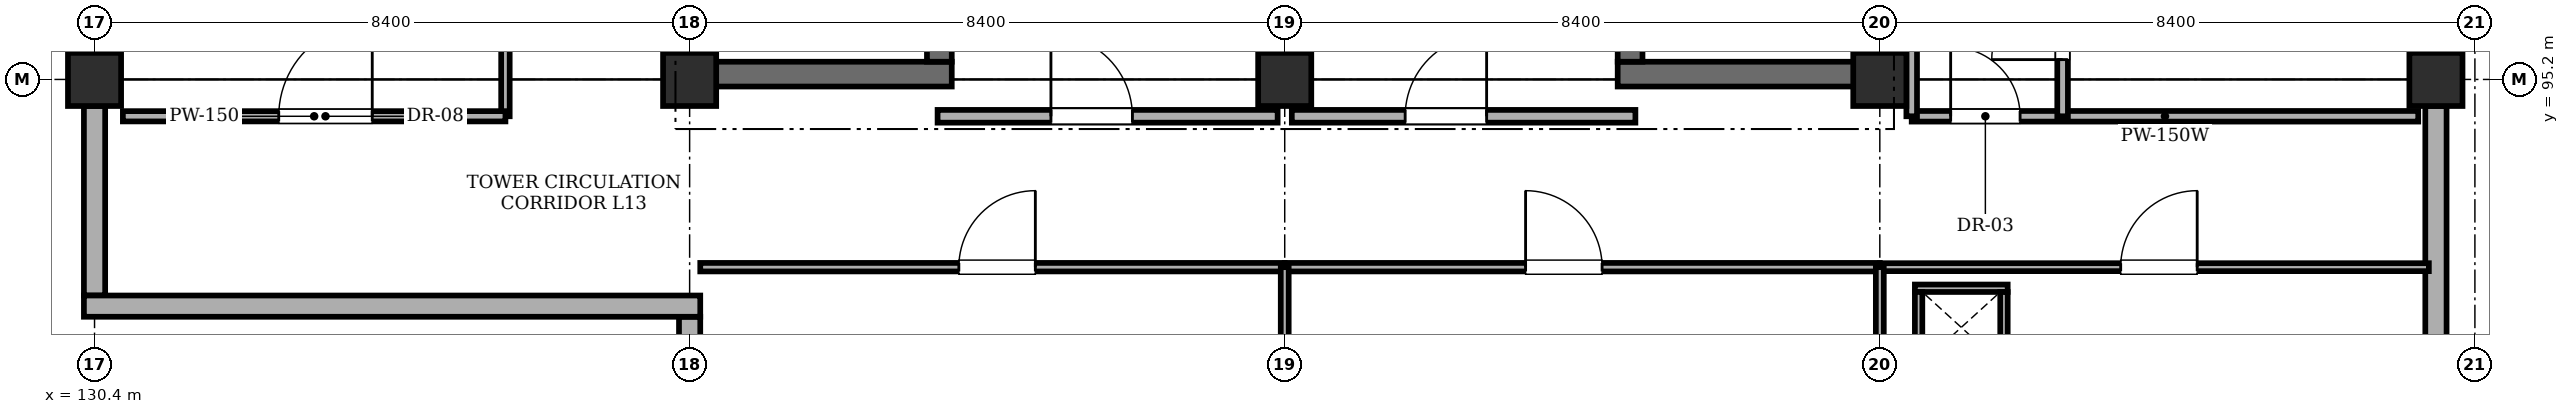
"""IFC4 building model, lengths in metres.
Left out: names, types, materials, properties, quantities, classifications, styles, units other than length and angle.
Written with IfcOpenShell. Run it as: python <this file> out.ifc"""

import sys

from ifc_helpers import new_model, si_unit, direction, frame, frame_2d, origin, origin_2d, place, context, subcontext, project, spatial, rectangle, extrude, element, fill, save


model = new_model("IFC4")
c1 = context("Model", 3, precision=1e-05, world=origin(), true_north=direction((0.0, 1.0)))
c2 = subcontext(c1, "Body", "Model", "MODEL_VIEW")
j1 = project(units=[si_unit("LENGTHUNIT", "METRE"), si_unit("PLANEANGLEUNIT", "RADIAN")], contexts=[c1])
p1 = place(None, origin())
s1 = spatial("IfcSite", under=j1, at=p1, CompositionType="ELEMENT")
p2 = place(p1, origin())
s2 = spatial("IfcBuilding", under=s1, at=p2, CompositionType="ELEMENT")
p3 = place(p2, frame((0.0, 0.0, 52.8)))
s3 = spatial("IfcBuildingStorey", under=s2, at=p3, CompositionType="ELEMENT", Elevation=52.8)
for number, where, z_axis, x_axis in (
    (1, (130.4, 95.2, 0.0), (0.0, 0.0, 1.0), (1.0, 0.0, 0.0)),
    (2, (138.8, 95.2, 0.0), (0.0, 0.0, 1.0), (1.0, 0.0, 0.0)),
    (3, (147.2, 95.2, 0.0), (0.0, 0.0, 1.0), (1.0, 0.0, 0.0)),
    (4, (155.6, 95.2, 0.0), (0.0, 0.0, 1.0), (1.0, 0.0, 0.0)),
    (5, (163.45, 95.2, 0.0), (0.0, 0.0, 1.0), (1.0, 0.0, 0.0)),
):
    element("IfcColumn", number, at=place(p3, frame(where, z_axis=z_axis, x_axis=x_axis)), inside=s3, PredefinedType="COLUMN", context=c2, shape_type="SweptSolid", body=[
        extrude(rectangle(XDim=0.75, YDim=0.75, at=origin_2d()), origin(), (0.0, 0.0, 1.0), 4.03),
    ])
p4 = place(p3, frame((138.7, 95.275, 0.0), z_axis=(0.0, 0.0, 1.0), x_axis=(1.0, 0.0, 0.0)))
e6 = element("IfcWall", 6, at=p4, inside=s3, PredefinedType="SHEAR", context=c2, shape_type="SweptSolid", body=[
    extrude(rectangle(XDim=3.8, YDim=0.35, at=frame_2d((1.9, 0.0))), origin(), (0.0, 0.0, 1.0), 4.03),
])
p5 = place(p3, frame((138.875, 95.45, 0.0), z_axis=(0.0, 0.0, 1.0), x_axis=(0.0, 1.0, 0.0)))
e7 = element("IfcWall", 7, at=p5, inside=s3, PredefinedType="SHEAR", context=c2, shape_type="SweptSolid", body=[
    extrude(rectangle(XDim=7.9, YDim=0.35, at=frame_2d((3.95, 0.0))), origin(), (0.0, 0.0, 1.0), 4.03),
])
p6 = place(p3, frame((142.325, 95.45, 0.0), z_axis=(0.0, 0.0, 1.0), x_axis=(0.0, 1.0, 0.0)))
e8 = element("IfcWall", 8, at=p6, inside=s3, PredefinedType="SHEAR", context=c2, shape_type="SweptSolid", body=[
    extrude(rectangle(XDim=7.9, YDim=0.35, at=frame_2d((3.95, 0.0))), origin(), (0.0, 0.0, 1.0), 4.03),
])
p7 = place(p6, frame((0.22, 0.0, 0.0)))
e9 = element("IfcOpeningElement", 9, at=p7, cuts=e8, PredefinedType="OPENING", context=c2, shape_type="SweptSolid", body=[
    extrude(rectangle(XDim=1.15, YDim=2.15, at=frame_2d((0.575, 1.075))), frame((0.0, 0.185, 0.0), z_axis=(0.0, -1.0, 0.0), x_axis=(1.0, 0.0, 0.0)), (0.0, 0.0, 1.0), 0.37),
])
p8 = place(p3, frame((151.9, 95.275, 0.0), z_axis=(0.0, 0.0, 1.0), x_axis=(1.0, 0.0, 0.0)))
e10 = element("IfcWall", 10, at=p8, inside=s3, PredefinedType="SHEAR", context=c2, shape_type="SweptSolid", body=[
    extrude(rectangle(XDim=3.8, YDim=0.35, at=frame_2d((1.9, 0.0))), origin(), (0.0, 0.0, 1.0), 4.03),
])
p9 = place(p3, frame((152.075, 95.45, 0.0), z_axis=(0.0, 0.0, 1.0), x_axis=(0.0, 1.0, 0.0)))
e11 = element("IfcWall", 11, at=p9, inside=s3, PredefinedType="SHEAR", context=c2, shape_type="SweptSolid", body=[
    extrude(rectangle(XDim=7.9, YDim=0.35, at=frame_2d((3.95, 0.0))), origin(), (0.0, 0.0, 1.0), 4.03),
])
p10 = place(p9, frame((0.35, 0.0, 0.0)))
e12 = element("IfcOpeningElement", 12, at=p10, cuts=e11, PredefinedType="OPENING", context=c2, shape_type="SweptSolid", body=[
    extrude(rectangle(XDim=1.15, YDim=2.15, at=frame_2d((0.575, 1.075))), frame((0.0, 0.185, 0.0), z_axis=(0.0, -1.0, 0.0), x_axis=(1.0, 0.0, 0.0)), (0.0, 0.0, 1.0), 0.37),
])
p11 = place(p3, frame((155.525, 95.45, 0.0), z_axis=(0.0, 0.0, 1.0), x_axis=(0.0, 1.0, 0.0)))
e13 = element("IfcWall", 13, at=p11, inside=s3, PredefinedType="SHEAR", context=c2, shape_type="SweptSolid", body=[
    extrude(rectangle(XDim=7.9, YDim=0.35, at=frame_2d((3.95, 0.0))), origin(), (0.0, 0.0, 1.0), 4.03),
])
p12 = place(p3, frame((163.45, 94.825, 0.0), z_axis=(0.0, 0.0, 1.0), x_axis=(0.0, -1.0, 0.0)))
e14 = element("IfcWall", 14, at=p12, inside=s3, PredefinedType="STANDARD", context=c2, shape_type="SweptSolid", body=[
    extrude(rectangle(XDim=7.65, YDim=0.3, at=frame_2d((3.825, 0.0))), origin(), (0.0, 0.0, 1.0), 3.33),
])
p13 = place(p12, frame((4.2, 0.0, 1.1)))
e15 = element("IfcOpeningElement", 15, at=p13, cuts=e14, PredefinedType="OPENING", context=c2, shape_type="SweptSolid", body=[
    extrude(rectangle(XDim=1.8, YDim=1.8, at=frame_2d((0.9, 0.9))), frame((0.0, 0.16, 0.0), z_axis=(0.0, -1.0, 0.0), x_axis=(1.0, 0.0, 0.0)), (0.0, 0.0, 1.0), 0.32),
])
p14 = place(p3, frame((163.45, 103.225, 0.0), z_axis=(0.0, 0.0, 1.0), x_axis=(0.0, -1.0, 0.0)))
e16 = element("IfcWall", 16, at=p14, inside=s3, PredefinedType="STANDARD", context=c2, shape_type="SweptSolid", body=[
    extrude(rectangle(XDim=7.65, YDim=0.3, at=frame_2d((3.825, 0.0))), origin(), (0.0, 0.0, 1.0), 3.33),
])
p15 = place(p14, frame((1.15, 0.0, 1.1)))
e17 = element("IfcOpeningElement", 17, at=p15, cuts=e16, PredefinedType="OPENING", context=c2, shape_type="SweptSolid", body=[
    extrude(rectangle(XDim=1.4, YDim=1.4, at=frame_2d((0.7, 0.7))), frame((0.0, 0.16, 0.0), z_axis=(0.0, -1.0, 0.0), x_axis=(1.0, 0.0, 0.0)), (0.0, 0.0, 1.0), 0.32),
])
p16 = place(p3, frame((130.4, 92.15, 0.0), z_axis=(0.0, 0.0, 1.0), x_axis=(0.0, 1.0, 0.0)))
e18 = element("IfcWall", 18, at=p16, inside=s3, PredefinedType="STANDARD", context=c2, shape_type="SweptSolid", body=[
    extrude(rectangle(XDim=2.675, YDim=0.3, at=frame_2d((1.337, 0.0))), origin(), (0.0, 0.0, 1.0), 4.03),
])
p17 = place(p3, frame((138.8, 87.175, 0.0), z_axis=(0.0, 0.0, 1.0), x_axis=(0.0, 1.0, 0.0)))
e19 = element("IfcWall", 19, at=p17, inside=s3, PredefinedType="STANDARD", context=c2, shape_type="SweptSolid", body=[
    extrude(rectangle(XDim=4.675, YDim=0.3, at=frame_2d((2.337, 0.0))), origin(), (0.0, 0.0, 1.0), 3.33),
])
p18 = place(p17, frame((2.4, 0.0, 0.95)))
e20 = element("IfcOpeningElement", 20, at=p18, cuts=e19, PredefinedType="OPENING", context=c2, shape_type="SweptSolid", body=[
    extrude(rectangle(XDim=1.5, YDim=1.8, at=frame_2d((0.75, 0.9))), frame((0.0, 0.16, 0.0), z_axis=(0.0, -1.0, 0.0), x_axis=(1.0, 0.0, 0.0)), (0.0, 0.0, 1.0), 0.32),
])
p19 = place(p3, frame((130.4, 95.575, 0.0), z_axis=(0.0, 0.0, 1.0), x_axis=(0.0, 1.0, 0.0)))
e21 = element("IfcWall", 21, at=p19, inside=s3, PredefinedType="STANDARD", context=c2, shape_type="SweptSolid", body=[
    extrude(rectangle(XDim=7.65, YDim=0.3, at=frame_2d((3.825, 0.0))), origin(), (0.0, 0.0, 1.0), 3.33),
])
p20 = place(p19, frame((2.4, 0.0, 1.0)))
e22 = element("IfcOpeningElement", 22, at=p20, cuts=e21, PredefinedType="OPENING", context=c2, shape_type="SweptSolid", body=[
    extrude(rectangle(XDim=1.8, YDim=1.8, at=frame_2d((0.9, 0.9))), frame((0.0, 0.16, 0.0), z_axis=(0.0, -1.0, 0.0), x_axis=(1.0, 0.0, 0.0)), (0.0, 0.0, 1.0), 0.32),
])
p21 = place(p3, frame((138.95, 92.0, 0.0), z_axis=(0.0, 0.0, 1.0), x_axis=(-1.0, 0.0, 0.0)))
e23 = element("IfcWall", 23, at=p21, inside=s3, PredefinedType="STANDARD", context=c2, shape_type="SweptSolid", body=[
    extrude(rectangle(XDim=8.7, YDim=0.3, at=frame_2d((4.35, 0.0))), origin(), (0.0, 0.0, 1.0), 4.03),
])
p22 = place(p3, frame((142.3, 94.68, 0.0), z_axis=(0.0, 0.0, 1.0), x_axis=(1.0, 0.0, 0.0)))
e24 = element("IfcWall", 24, at=p22, inside=s3, PredefinedType="STANDARD", context=c2, shape_type="SweptSolid", body=[
    extrude(rectangle(XDim=4.8, YDim=0.18, at=frame_2d((2.4, 0.0))), origin(), (0.0, 0.0, 1.0), 4.03),
])
p23 = place(p22, frame((1.6, 0.0, 0.0)))
e25 = element("IfcOpeningElement", 25, at=p23, cuts=e24, PredefinedType="OPENING", context=c2, shape_type="SweptSolid", body=[
    extrude(rectangle(XDim=1.15, YDim=2.15, at=frame_2d((0.575, 1.075))), frame((0.0, 0.1, 0.0), z_axis=(0.0, -1.0, 0.0), x_axis=(1.0, 0.0, 0.0)), (0.0, 0.0, 1.0), 0.2),
])
p24 = place(p3, frame((147.3, 94.68, 0.0), z_axis=(0.0, 0.0, 1.0), x_axis=(1.0, 0.0, 0.0)))
e26 = element("IfcWall", 26, at=p24, inside=s3, PredefinedType="STANDARD", context=c2, shape_type="SweptSolid", body=[
    extrude(rectangle(XDim=4.85, YDim=0.18, at=frame_2d((2.425, 0.0))), origin(), (0.0, 0.0, 1.0), 4.03),
])
p25 = place(p24, frame((1.6, 0.0, 0.0)))
e27 = element("IfcOpeningElement", 27, at=p25, cuts=e26, PredefinedType="OPENING", context=c2, shape_type="SweptSolid", body=[
    extrude(rectangle(XDim=1.15, YDim=2.15, at=frame_2d((0.575, 1.075))), frame((0.0, 0.1, 0.0), z_axis=(0.0, -1.0, 0.0), x_axis=(1.0, 0.0, 0.0)), (0.0, 0.0, 1.0), 0.2),
])
p26 = place(p3, frame((156.05, 94.68, 0.0), z_axis=(0.0, 0.0, 1.0), x_axis=(1.0, 0.0, 0.0)))
e28 = element("IfcWall", 28, at=p26, inside=s3, PredefinedType="PARTITIONING", context=c2, shape_type="SweptSolid", body=[
    extrude(rectangle(XDim=7.15, YDim=0.15, at=frame_2d((3.575, 0.0))), origin(), (0.0, 0.0, 1.0), 4.03),
])
p27 = place(p26, frame((0.55, 0.0, 0.0)))
e29 = element("IfcOpeningElement", 29, at=p27, cuts=e28, PredefinedType="OPENING", context=c2, shape_type="SweptSolid", body=[
    extrude(rectangle(XDim=0.98, YDim=2.12, at=frame_2d((0.49, 1.06))), frame((0.0, 0.085, 0.0), z_axis=(0.0, -1.0, 0.0), x_axis=(1.0, 0.0, 0.0)), (0.0, 0.0, 1.0), 0.17),
])
p28 = place(p3, frame((158.18, 94.68, 0.0), z_axis=(0.0, 0.0, 1.0), x_axis=(0.0, 1.0, 0.0)))
e30 = element("IfcWall", 30, at=p28, inside=s3, PredefinedType="PARTITIONING", context=c2, shape_type="SweptSolid", body=[
    extrude(rectangle(XDim=8.57, YDim=0.15, at=frame_2d((4.285, 0.0))), origin(), (0.0, 0.0, 1.0), 4.03),
])
p29 = place(p28, frame((0.8, 0.0, 0.0)))
e31 = element("IfcOpeningElement", 31, at=p29, cuts=e30, PredefinedType="OPENING", context=c2, shape_type="SweptSolid", body=[
    extrude(rectangle(XDim=1.0, YDim=2.12, at=frame_2d((0.5, 1.06))), frame((0.0, 0.085, 0.0), z_axis=(0.0, -1.0, 0.0), x_axis=(1.0, 0.0, 0.0)), (0.0, 0.0, 1.0), 0.17),
])
p30 = place(p28, frame((3.5, 0.0, 0.0)))
e32 = element("IfcOpeningElement", 32, at=p30, cuts=e30, PredefinedType="OPENING", context=c2, shape_type="SweptSolid", body=[
    extrude(rectangle(XDim=0.92, YDim=2.1, at=frame_2d((0.46, 1.05))), frame((0.0, 0.085, 0.0), z_axis=(0.0, -1.0, 0.0), x_axis=(1.0, 0.0, 0.0)), (0.0, 0.0, 1.0), 0.17),
])
p31 = place(p28, frame((6.4, 0.0, 0.0)))
e33 = element("IfcOpeningElement", 33, at=p31, cuts=e30, PredefinedType="OPENING", context=c2, shape_type="SweptSolid", body=[
    extrude(rectangle(XDim=0.92, YDim=2.1, at=frame_2d((0.46, 1.05))), frame((0.0, 0.085, 0.0), z_axis=(0.0, -1.0, 0.0), x_axis=(1.0, 0.0, 0.0)), (0.0, 0.0, 1.0), 0.17),
])
p32 = place(p3, frame((156.05, 94.68, 0.0), z_axis=(0.0, 0.0, 1.0), x_axis=(0.0, 1.0, 0.0)))
e34 = element("IfcWall", 34, at=p32, inside=s3, PredefinedType="PARTITIONING", context=c2, shape_type="SweptSolid", body=[
    extrude(rectangle(XDim=8.57, YDim=0.15, at=frame_2d((4.285, 0.0))), origin(), (0.0, 0.0, 1.0), 4.03),
])
p33 = place(p3, frame((136.2, 94.68, 0.0), z_axis=(0.0, 0.0, 1.0), x_axis=(0.0, 1.0, 0.0)))
e35 = element("IfcWall", 35, at=p33, inside=s3, PredefinedType="PARTITIONING", context=c2, shape_type="SweptSolid", body=[
    extrude(rectangle(XDim=9.07, YDim=0.12, at=frame_2d((4.535, 0.0))), origin(), (0.0, 0.0, 1.0), 4.03),
])
p34 = place(p3, frame((130.8, 94.68, 0.0), z_axis=(0.0, 0.0, 1.0), x_axis=(1.0, 0.0, 0.0)))
e36 = element("IfcWall", 36, at=p34, inside=s3, PredefinedType="PARTITIONING", context=c2, shape_type="SweptSolid", body=[
    extrude(rectangle(XDim=5.4, YDim=0.145, at=frame_2d((2.7, 0.0))), origin(), (0.0, 0.0, 1.0), 4.03),
])
p35 = place(p34, frame((2.2, 0.0, 0.0)))
e37 = element("IfcOpeningElement", 37, at=p35, cuts=e36, PredefinedType="OPENING", context=c2, shape_type="SweptSolid", body=[
    extrude(rectangle(XDim=1.32, YDim=2.2, at=frame_2d((0.66, 1.1))), frame((0.0, 0.083, 0.0), z_axis=(0.0, -1.0, 0.0), x_axis=(1.0, 0.0, 0.0)), (0.0, 0.0, 1.0), 0.165),
])
p36 = place(p3, frame((138.95, 92.55, 0.0), z_axis=(0.0, 0.0, 1.0), x_axis=(1.0, 0.0, 0.0)))
e38 = element("IfcWall", 38, at=p36, inside=s3, PredefinedType="PARTITIONING", context=c2, shape_type="SweptSolid", body=[
    extrude(rectangle(XDim=8.25, YDim=0.12, at=frame_2d((4.125, 0.0))), origin(), (0.0, 0.0, 1.0), 4.03),
])
p37 = place(p36, frame((3.65, 0.0, 0.0)))
e39 = element("IfcOpeningElement", 39, at=p37, cuts=e38, PredefinedType="OPENING", context=c2, shape_type="SweptSolid", body=[
    extrude(rectangle(XDim=1.08, YDim=2.15, at=frame_2d((0.54, 1.075))), frame((0.0, 0.07, 0.0), z_axis=(0.0, -1.0, 0.0), x_axis=(1.0, 0.0, 0.0)), (0.0, 0.0, 1.0), 0.14),
])
p38 = place(p3, frame((147.2, 92.55, 0.0), z_axis=(0.0, 0.0, 1.0), x_axis=(1.0, 0.0, 0.0)))
e40 = element("IfcWall", 40, at=p38, inside=s3, PredefinedType="PARTITIONING", context=c2, shape_type="SweptSolid", body=[
    extrude(rectangle(XDim=8.4, YDim=0.12, at=frame_2d((4.2, 0.0))), origin(), (0.0, 0.0, 1.0), 4.03),
])
p39 = place(p38, frame((3.4, 0.0, 0.0)))
e41 = element("IfcOpeningElement", 41, at=p39, cuts=e40, PredefinedType="OPENING", context=c2, shape_type="SweptSolid", body=[
    extrude(rectangle(XDim=1.08, YDim=2.15, at=frame_2d((0.54, 1.075))), frame((0.0, 0.07, 0.0), z_axis=(0.0, -1.0, 0.0), x_axis=(1.0, 0.0, 0.0)), (0.0, 0.0, 1.0), 0.14),
])
p40 = place(p3, frame((147.2, 78.55, 0.0), z_axis=(0.0, 0.0, 1.0), x_axis=(0.0, 1.0, 0.0)))
e42 = element("IfcWall", 42, at=p40, inside=s3, PredefinedType="PARTITIONING", context=c2, shape_type="SweptSolid", body=[
    extrude(rectangle(XDim=14.0, YDim=0.112, at=frame_2d((7.0, 0.0))), origin(), (0.0, 0.0, 1.0), 3.33),
])
p41 = place(p3, frame((155.6, 92.55, 0.0), z_axis=(0.0, 0.0, 1.0), x_axis=(1.0, 0.0, 0.0)))
e43 = element("IfcWall", 43, at=p41, inside=s3, PredefinedType="PARTITIONING", context=c2, shape_type="SweptSolid", body=[
    extrude(rectangle(XDim=7.75, YDim=0.112, at=frame_2d((3.875, 0.0))), origin(), (0.0, 0.0, 1.0), 4.03),
])
p42 = place(p41, frame((3.4, 0.0, 0.0)))
e44 = element("IfcOpeningElement", 44, at=p42, cuts=e43, PredefinedType="OPENING", context=c2, shape_type="SweptSolid", body=[
    extrude(rectangle(XDim=1.08, YDim=2.15, at=frame_2d((0.54, 1.075))), frame((0.0, 0.066, 0.0), z_axis=(0.0, -1.0, 0.0), x_axis=(1.0, 0.0, 0.0)), (0.0, 0.0, 1.0), 0.132),
])
p43 = place(p3, frame((155.6, 78.55, 0.0), z_axis=(0.0, 0.0, 1.0), x_axis=(0.0, 1.0, 0.0)))
e45 = element("IfcWall", 45, at=p43, inside=s3, PredefinedType="PARTITIONING", context=c2, shape_type="SweptSolid", body=[
    extrude(rectangle(XDim=14.0, YDim=0.112, at=frame_2d((7.0, 0.0))), origin(), (0.0, 0.0, 1.0), 3.33),
])
p44 = place(p3, frame((156.095, 92.252, 0.0), z_axis=(0.0, 0.0, 1.0), x_axis=(1.0, 0.0, 0.0)))
e46 = element("IfcWall", 46, at=p44, inside=s3, PredefinedType="PARTITIONING", context=c2, shape_type="SweptSolid", body=[
    extrude(rectangle(XDim=1.31, YDim=0.105, at=frame_2d((0.655, 0.0))), origin(), (0.0, 0.0, 1.0), 4.03),
])
for number, where, z_axis, x_axis in (
    (47, (156.147, 91.2, 0.0), (0.0, 0.0, 1.0), (0.0, 1.0, 0.0)),
    (48, (157.353, 91.2, 0.0), (0.0, 0.0, 1.0), (0.0, 1.0, 0.0)),
):
    element("IfcWall", number, at=place(p3, frame(where, z_axis=z_axis, x_axis=x_axis)), inside=s3, PredefinedType="PARTITIONING", context=c2, shape_type="SweptSolid", body=[
        extrude(rectangle(XDim=1.0, YDim=0.105, at=frame_2d((0.5, 0.0))), origin(), (0.0, 0.0, 1.0), 4.03),
    ])
p45 = place(p23, origin())
e49 = element("IfcDoor", 49, at=p45, inside=s3, OperationType="SINGLE_SWING_LEFT", PredefinedType="DOOR", context=c2, shape_type="SweptSolid", body=[
    extrude(rectangle(XDim=1.15, YDim=2.15, at=frame_2d((0.575, 1.075))), frame((0.0, 0.025, 0.0), z_axis=(0.0, -1.0, 0.0), x_axis=(1.0, 0.0, 0.0)), (0.0, 0.0, 1.0), 0.05),
])
fill(e25, e49)
p46 = place(p25, origin())
e50 = element("IfcDoor", 50, at=p46, inside=s3, OperationType="SINGLE_SWING_RIGHT", PredefinedType="DOOR", context=c2, shape_type="SweptSolid", body=[
    extrude(rectangle(XDim=1.15, YDim=2.15, at=frame_2d((0.575, 1.075))), frame((0.0, 0.025, 0.0), z_axis=(0.0, -1.0, 0.0), x_axis=(1.0, 0.0, 0.0)), (0.0, 0.0, 1.0), 0.05),
])
fill(e27, e50)
p47 = place(p27, origin())
e51 = element("IfcDoor", 51, at=p47, inside=s3, OperationType="SINGLE_SWING_LEFT", PredefinedType="DOOR", context=c2, shape_type="SweptSolid", body=[
    extrude(rectangle(XDim=0.98, YDim=2.12, at=frame_2d((0.49, 1.06))), frame((0.0, 0.025, 0.0), z_axis=(0.0, -1.0, 0.0), x_axis=(1.0, 0.0, 0.0)), (0.0, 0.0, 1.0), 0.05),
])
fill(e29, e51)
p48 = place(p29, origin())
e52 = element("IfcDoor", 52, at=p48, inside=s3, OperationType="SINGLE_SWING_LEFT", PredefinedType="DOOR", context=c2, shape_type="SweptSolid", body=[
    extrude(rectangle(XDim=1.0, YDim=2.12, at=frame_2d((0.5, 1.06))), frame((0.0, 0.025, 0.0), z_axis=(0.0, -1.0, 0.0), x_axis=(1.0, 0.0, 0.0)), (0.0, 0.0, 1.0), 0.05),
])
fill(e31, e52)
p49 = place(p35, origin())
e53 = element("IfcDoor", 53, at=p49, inside=s3, OperationType="SINGLE_SWING_RIGHT", PredefinedType="DOOR", context=c2, shape_type="SweptSolid", body=[
    extrude(rectangle(XDim=1.32, YDim=2.2, at=frame_2d((0.66, 1.1))), frame((0.0, 0.025, 0.0), z_axis=(0.0, -1.0, 0.0), x_axis=(1.0, 0.0, 0.0)), (0.0, 0.0, 1.0), 0.05),
])
fill(e37, e53)
p50 = place(p37, origin())
e54 = element("IfcDoor", 54, at=p50, inside=s3, OperationType="SINGLE_SWING_RIGHT", PredefinedType="DOOR", context=c2, shape_type="SweptSolid", body=[
    extrude(rectangle(XDim=1.08, YDim=2.15, at=frame_2d((0.54, 1.075))), frame((0.0, 0.025, 0.0), z_axis=(0.0, -1.0, 0.0), x_axis=(1.0, 0.0, 0.0)), (0.0, 0.0, 1.0), 0.05),
])
fill(e39, e54)
p51 = place(p39, origin())
e55 = element("IfcDoor", 55, at=p51, inside=s3, OperationType="SINGLE_SWING_LEFT", PredefinedType="DOOR", context=c2, shape_type="SweptSolid", body=[
    extrude(rectangle(XDim=1.08, YDim=2.15, at=frame_2d((0.54, 1.075))), frame((0.0, 0.025, 0.0), z_axis=(0.0, -1.0, 0.0), x_axis=(1.0, 0.0, 0.0)), (0.0, 0.0, 1.0), 0.05),
])
fill(e41, e55)
p52 = place(p42, origin())
e56 = element("IfcDoor", 56, at=p52, inside=s3, OperationType="SINGLE_SWING_RIGHT", PredefinedType="DOOR", context=c2, shape_type="SweptSolid", body=[
    extrude(rectangle(XDim=1.08, YDim=2.15, at=frame_2d((0.54, 1.075))), frame((0.0, 0.025, 0.0), z_axis=(0.0, -1.0, 0.0), x_axis=(1.0, 0.0, 0.0)), (0.0, 0.0, 1.0), 0.05),
])
fill(e44, e56)
save(model, sys.argv[1])
